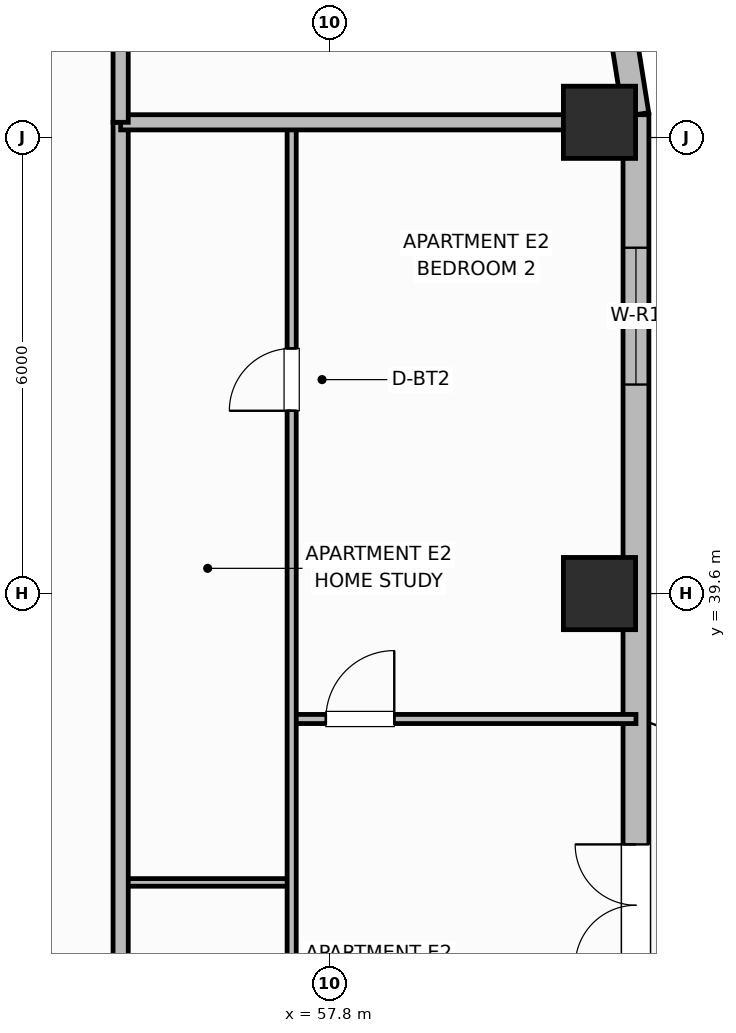
"""IFC4 building model, lengths in metres.
Left out: names, types, materials, properties, quantities, classifications, styles, units other than length and angle.
Written with IfcOpenShell. Run it as: python <this file> out.ifc"""

import sys

from ifc_helpers import new_model, si_unit, direction, frame, frame_2d, origin, origin_2d, place, context, subcontext, project, spatial, rectangle, extrude, element, fill, save


model = new_model("IFC4")
c1 = context("Model", 3, precision=1e-05, world=origin(), true_north=direction((0.0, 1.0)))
c2 = subcontext(c1, "Body", "Model", "MODEL_VIEW")
j1 = project(units=[si_unit("LENGTHUNIT", "METRE"), si_unit("PLANEANGLEUNIT", "RADIAN")], contexts=[c1])
p1 = place(None, origin())
s1 = spatial("IfcSite", under=j1, at=p1, CompositionType="ELEMENT")
p2 = place(p1, origin())
s2 = spatial("IfcBuilding", under=s1, at=p2, CompositionType="ELEMENT")
p3 = place(p2, frame((0.0, 0.0, 173.7)))
s3 = spatial("IfcBuildingStorey", under=s2, at=p3, CompositionType="ELEMENT", Elevation=173.7)
for number, where, z_axis, x_axis in (
    (1, (61.35, 39.6, 0.0), (0.0, 0.0, 1.0), (1.0, 0.0, 0.0)),
    (2, (61.35, 45.8, 0.0), (0.0, 0.0, 1.0), (1.0, 0.0, 0.0)),
):
    element("IfcColumn", number, at=place(p3, frame(where, z_axis=z_axis, x_axis=x_axis)), inside=s3, PredefinedType="COLUMN", context=c2, shape_type="SweptSolid", body=[
        extrude(rectangle(XDim=0.95, YDim=0.95, at=origin_2d()), origin(), (0.0, 0.0, 1.0), 3.7),
    ])
p4 = place(p3, frame((61.83, 32.6, 0.0), z_axis=(0.0, 0.0, 1.0), x_axis=(0.0, 1.0, 0.0)))
e3 = element("IfcWall", 3, at=p4, inside=s3, PredefinedType="SOLIDWALL", context=c2, shape_type="SweptSolid", body=[
    extrude(rectangle(XDim=13.3, YDim=0.34, at=frame_2d((6.65, 0.0))), origin(), (0.0, 0.0, 1.0), 2.72),
])
p5 = place(p4, frame((2.1, 0.0, 0.0)))
e4 = element("IfcOpeningElement", 4, at=p5, cuts=e3, PredefinedType="OPENING", context=c2, shape_type="SweptSolid", body=[
    extrude(rectangle(XDim=1.6, YDim=2.1, at=frame_2d((0.8, 1.05))), frame((0.0, 0.18, 0.0), z_axis=(0.0, -1.0, 0.0), x_axis=(1.0, 0.0, 0.0)), (0.0, 0.0, 1.0), 0.36),
])
p6 = place(p4, frame((9.75, 0.0, 0.75)))
e5 = element("IfcOpeningElement", 5, at=p6, cuts=e3, PredefinedType="OPENING", context=c2, shape_type="SweptSolid", body=[
    extrude(rectangle(XDim=1.8, YDim=1.85, at=frame_2d((0.9, 0.925))), frame((0.0, 0.18, 0.0), z_axis=(0.0, -1.0, 0.0), x_axis=(1.0, 0.0, 0.0)), (0.0, 0.0, 1.0), 0.36),
])
p7 = place(p3, frame((61.83, 45.9, 0.0), z_axis=(0.0, 0.0, 1.0), x_axis=(-0.156481329164, 0.987680916907, 0.0)))
e6 = element("IfcWall", 6, at=p7, inside=s3, PredefinedType="SOLIDWALL", context=c2, shape_type="SweptSolid", body=[
    extrude(rectangle(XDim=1.136, YDim=0.34, at=frame_2d((0.568, 0.0))), origin(), (0.0, 0.0, 1.0), 2.72),
])
p8 = place(p3, frame((55.05, 35.8, 0.0), z_axis=(0.0, 0.0, 1.0), x_axis=(1.0, 0.0, 0.0)))
e7 = element("IfcWall", 7, at=p8, inside=s3, PredefinedType="PARTITIONING", context=c2, shape_type="SweptSolid", body=[
    extrude(rectangle(XDim=2.25, YDim=0.1, at=frame_2d((1.125, 0.0))), origin(), (0.0, 0.0, 1.0), 2.55),
])
p9 = place(p3, frame((57.3, 37.95, 0.0), z_axis=(0.0, 0.0, 1.0), x_axis=(1.0, 0.0, 0.0)))
e8 = element("IfcWall", 8, at=p9, inside=s3, PredefinedType="PARTITIONING", context=c2, shape_type="SweptSolid", body=[
    extrude(rectangle(XDim=4.53, YDim=0.12, at=frame_2d((2.265, 0.0))), origin(), (0.0, 0.0, 1.0), 2.55),
])
p10 = place(p9, frame((0.45, 0.0, 0.0)))
e9 = element("IfcOpeningElement", 9, at=p10, cuts=e8, PredefinedType="OPENING", context=c2, shape_type="SweptSolid", body=[
    extrude(rectangle(XDim=0.9, YDim=2.1, at=frame_2d((0.45, 1.05))), frame((0.0, 0.07, 0.0), z_axis=(0.0, -1.0, 0.0), x_axis=(1.0, 0.0, 0.0)), (0.0, 0.0, 1.0), 0.14),
])
p11 = place(p3, frame((57.3, 26.64, 0.0), z_axis=(0.0, 0.0, 1.0), x_axis=(0.0, 1.0, 0.0)))
e10 = element("IfcWall", 10, at=p11, inside=s3, PredefinedType="PARTITIONING", context=c2, shape_type="SweptSolid", body=[
    extrude(rectangle(XDim=19.12, YDim=0.12, at=frame_2d((9.56, 0.0))), origin(), (0.0, 0.0, 1.0), 2.55),
])
p12 = place(p11, frame((2.81, 0.0, 0.0)))
e11 = element("IfcOpeningElement", 11, at=p12, cuts=e10, PredefinedType="OPENING", context=c2, shape_type="SweptSolid", body=[
    extrude(rectangle(XDim=0.9, YDim=2.1, at=frame_2d((0.45, 1.05))), frame((0.0, 0.07, 0.0), z_axis=(0.0, -1.0, 0.0), x_axis=(1.0, 0.0, 0.0)), (0.0, 0.0, 1.0), 0.14),
])
p13 = place(p11, frame((15.365, 0.0, 0.0)))
e12 = element("IfcOpeningElement", 12, at=p13, cuts=e10, PredefinedType="OPENING", context=c2, shape_type="SweptSolid", body=[
    extrude(rectangle(XDim=0.82, YDim=2.08, at=frame_2d((0.41, 1.04))), frame((0.0, 0.07, 0.0), z_axis=(0.0, -1.0, 0.0), x_axis=(1.0, 0.0, 0.0)), (0.0, 0.0, 1.0), 0.14),
])
p14 = place(p3, frame((55.05, 10.6, 0.0), z_axis=(0.0, 0.0, 1.0), x_axis=(0.0, 1.0, 0.0)))
e13 = element("IfcWall", 13, at=p14, inside=s3, PredefinedType="PARTITIONING", context=c2, shape_type="SweptSolid", body=[
    extrude(rectangle(XDim=35.2, YDim=0.2, at=frame_2d((17.6, 0.0))), origin(), (0.0, 0.0, 1.0), 2.55),
])
p15 = place(p14, frame((2.65, 0.0, 0.0)))
e14 = element("IfcOpeningElement", 14, at=p15, cuts=e13, PredefinedType="OPENING", context=c2, shape_type="SweptSolid", body=[
    extrude(rectangle(XDim=1.0, YDim=2.15, at=frame_2d((0.5, 1.075))), frame((0.0, 0.11, 0.0), z_axis=(0.0, -1.0, 0.0), x_axis=(1.0, 0.0, 0.0)), (0.0, 0.0, 1.0), 0.22),
])
p16 = place(p14, frame((19.95, 0.0, 0.0)))
e15 = element("IfcOpeningElement", 15, at=p16, cuts=e13, PredefinedType="OPENING", context=c2, shape_type="SweptSolid", body=[
    extrude(rectangle(XDim=1.0, YDim=2.15, at=frame_2d((0.5, 1.075))), frame((0.0, 0.11, 0.0), z_axis=(0.0, -1.0, 0.0), x_axis=(1.0, 0.0, 0.0)), (0.0, 0.0, 1.0), 0.22),
])
p17 = place(p3, frame((55.05, 45.8, 0.0), z_axis=(0.0, 0.0, 1.0), x_axis=(1.0, 0.0, 0.0)))
e16 = element("IfcWall", 16, at=p17, inside=s3, PredefinedType="PARTITIONING", context=c2, shape_type="SweptSolid", body=[
    extrude(rectangle(XDim=6.36, YDim=0.2, at=frame_2d((3.18, 0.0))), origin(), (0.0, 0.0, 1.0), 2.55),
])
p18 = place(p3, frame((55.05, 45.8, 0.0), z_axis=(0.0, 0.0, 1.0), x_axis=(0.0, 1.0, 0.0)))
e17 = element("IfcWall", 17, at=p18, inside=s3, PredefinedType="PARTITIONING", context=c2, shape_type="SweptSolid", body=[
    extrude(rectangle(XDim=3.73, YDim=0.2, at=frame_2d((1.865, 0.0))), origin(), (0.0, 0.0, 1.0), 2.55),
])
p19 = place(p5, origin())
e18 = element("IfcDoor", 18, at=p19, inside=s3, OperationType="DOUBLE_DOOR_SINGLE_SWING", PredefinedType="DOOR", context=c2, shape_type="SweptSolid", body=[
    extrude(rectangle(XDim=1.6, YDim=2.1, at=frame_2d((0.8, 1.05))), frame((0.0, 0.025, 0.0), z_axis=(0.0, -1.0, 0.0), x_axis=(1.0, 0.0, 0.0)), (0.0, 0.0, 1.0), 0.05),
])
fill(e4, e18)
p20 = place(p6, origin())
e19 = element("IfcWindow", 19, at=p20, inside=s3, PartitioningType="SINGLE_PANEL", PredefinedType="WINDOW", context=c2, shape_type="SweptSolid", body=[
    extrude(rectangle(XDim=1.8, YDim=1.85, at=frame_2d((0.9, 0.925))), frame((0.0, 0.03, 0.0), z_axis=(0.0, -1.0, 0.0), x_axis=(1.0, 0.0, 0.0)), (0.0, 0.0, 1.0), 0.06),
])
fill(e5, e19)
p21 = place(p10, origin())
e20 = element("IfcDoor", 20, at=p21, inside=s3, OperationType="SINGLE_SWING_RIGHT", PredefinedType="DOOR", context=c2, shape_type="SweptSolid", body=[
    extrude(rectangle(XDim=0.9, YDim=2.1, at=frame_2d((0.45, 1.05))), frame((0.0, 0.025, 0.0), z_axis=(0.0, -1.0, 0.0), x_axis=(1.0, 0.0, 0.0)), (0.0, 0.0, 1.0), 0.05),
])
fill(e9, e20)
p22 = place(p13, origin())
e21 = element("IfcDoor", 21, at=p22, inside=s3, OperationType="SINGLE_SWING_LEFT", PredefinedType="DOOR", context=c2, shape_type="SweptSolid", body=[
    extrude(rectangle(XDim=0.82, YDim=2.08, at=frame_2d((0.41, 1.04))), frame((0.0, 0.025, 0.0), z_axis=(0.0, -1.0, 0.0), x_axis=(1.0, 0.0, 0.0)), (0.0, 0.0, 1.0), 0.05),
])
fill(e12, e21)
save(model, sys.argv[1])
